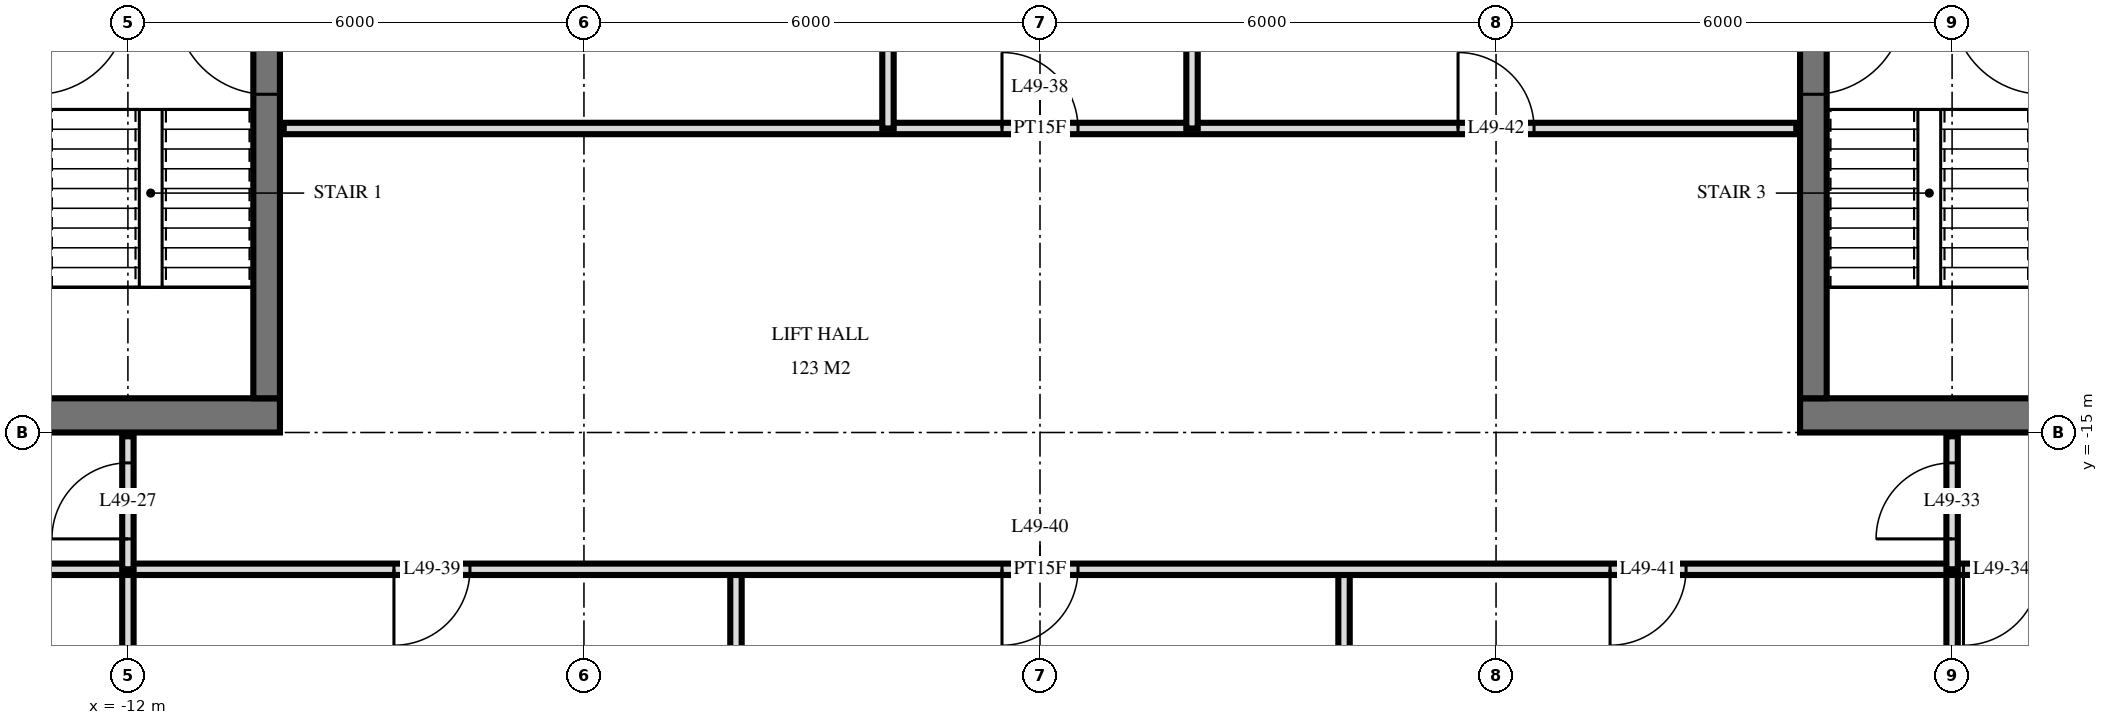
"""IFC4 building model, lengths in metres.
Left out: names, types, materials, properties, quantities, classifications, styles, units other than length and angle.
Written with IfcOpenShell. Run it as: python <this file> out.ifc"""

import sys

from ifc_helpers import new_model, si_unit, direction, frame, frame_2d, origin, place, context, subcontext, project, spatial, rectangle, extrude, element, fill, save


model = new_model("IFC4")
c1 = context("Model", 3, precision=1e-05, world=origin(), true_north=direction((0.0, 1.0)))
c2 = subcontext(c1, "Body", "Model", "MODEL_VIEW")
j1 = project(units=[si_unit("LENGTHUNIT", "METRE"), si_unit("PLANEANGLEUNIT", "RADIAN")], contexts=[c1])
p1 = place(None, origin())
s1 = spatial("IfcSite", under=j1, at=p1, CompositionType="ELEMENT")
p2 = place(p1, origin())
s2 = spatial("IfcBuilding", under=s1, at=p2, CompositionType="ELEMENT")
p3 = place(p2, frame((0.0, 0.0, 190.6)))
s3 = spatial("IfcBuildingStorey", under=s2, at=p3, CompositionType="ELEMENT", Elevation=190.6)
p4 = place(p3, frame((-24.5, -14.775, 0.0), z_axis=(0.0, 0.0, 1.0), x_axis=(1.0, 0.0, 0.0)))
e1 = element("IfcWall", 1, at=p4, inside=s3, PredefinedType="SHEAR", context=c2, shape_type="SweptSolid", body=[
    extrude(rectangle(XDim=14.5, YDim=0.45, at=frame_2d((7.25, 0.0))), origin(), (0.0, 0.0, 1.0), 3.5),
])
p5 = place(p4, frame((6.2, 0.0, 0.0)))
e2 = element("IfcOpeningElement", 2, at=p5, cuts=e1, PredefinedType="OPENING", context=c2, shape_type="SweptSolid", body=[
    extrude(rectangle(XDim=1.2, YDim=2.1, at=frame_2d((0.6, 1.05))), frame((0.0, 0.235, 0.0), z_axis=(0.0, -1.0, 0.0), x_axis=(1.0, 0.0, 0.0)), (0.0, 0.0, 1.0), 0.47),
])
p6 = place(p4, frame((9.25, 0.0, 0.0)))
e3 = element("IfcOpeningElement", 3, at=p6, cuts=e1, PredefinedType="OPENING", context=c2, shape_type="SweptSolid", body=[
    extrude(rectangle(XDim=1.1, YDim=2.1, at=frame_2d((0.55, 1.05))), frame((0.0, 0.235, 0.0), z_axis=(0.0, -1.0, 0.0), x_axis=(1.0, 0.0, 0.0)), (0.0, 0.0, 1.0), 0.47),
])
p7 = place(p4, frame((3.5, 0.0, 0.0)))
e4 = element("IfcOpeningElement", 4, at=p7, cuts=e1, PredefinedType="OPENING", context=c2, shape_type="SweptSolid", body=[
    extrude(rectangle(XDim=0.9, YDim=2.1, at=frame_2d((0.45, 1.05))), frame((0.0, 0.235, 0.0), z_axis=(0.0, -1.0, 0.0), x_axis=(1.0, 0.0, 0.0)), (0.0, 0.0, 1.0), 0.47),
])
p8 = place(p4, frame((1.05, 0.0, 0.0)))
e5 = element("IfcOpeningElement", 5, at=p8, cuts=e1, PredefinedType="OPENING", context=c2, shape_type="SweptSolid", body=[
    extrude(rectangle(XDim=1.0, YDim=2.1, at=frame_2d((0.5, 1.05))), frame((0.0, 0.235, 0.0), z_axis=(0.0, -1.0, 0.0), x_axis=(1.0, 0.0, 0.0)), (0.0, 0.0, 1.0), 0.47),
])
p9 = place(p3, frame((-10.175, -14.55, 0.0), z_axis=(0.0, 0.0, 1.0), x_axis=(0.0, 1.0, 0.0)))
e6 = element("IfcWall", 6, at=p9, inside=s3, PredefinedType="SHEAR", context=c2, shape_type="SweptSolid", body=[
    extrude(rectangle(XDim=14.1, YDim=0.35, at=frame_2d((7.05, 0.0))), origin(), (0.0, 0.0, 1.0), 3.5),
])
p10 = place(p9, frame((8.4, 0.0, 0.0)))
e7 = element("IfcOpeningElement", 7, at=p10, cuts=e6, PredefinedType="OPENING", context=c2, shape_type="SweptSolid", body=[
    extrude(rectangle(XDim=1.4, YDim=2.4, at=frame_2d((0.7, 1.2))), frame((0.0, 0.185, 0.0), z_axis=(0.0, -1.0, 0.0), x_axis=(1.0, 0.0, 0.0)), (0.0, 0.0, 1.0), 0.37),
])
p11 = place(p9, frame((10.0, 0.0, 0.0)))
e8 = element("IfcOpeningElement", 8, at=p11, cuts=e6, PredefinedType="OPENING", context=c2, shape_type="SweptSolid", body=[
    extrude(rectangle(XDim=1.4, YDim=2.4, at=frame_2d((0.7, 1.2))), frame((0.0, 0.185, 0.0), z_axis=(0.0, -1.0, 0.0), x_axis=(1.0, 0.0, 0.0)), (0.0, 0.0, 1.0), 0.37),
])
p12 = place(p9, frame((4.0, 0.0, 0.0)))
e9 = element("IfcOpeningElement", 9, at=p12, cuts=e6, PredefinedType="OPENING", context=c2, shape_type="SweptSolid", body=[
    extrude(rectangle(XDim=1.2, YDim=2.1, at=frame_2d((0.6, 1.05))), frame((0.0, 0.185, 0.0), z_axis=(0.0, -1.0, 0.0), x_axis=(1.0, 0.0, 0.0)), (0.0, 0.0, 1.0), 0.37),
])
p13 = place(p3, frame((10.0, -14.775, 0.0), z_axis=(0.0, 0.0, 1.0), x_axis=(1.0, 0.0, 0.0)))
e10 = element("IfcWall", 10, at=p13, inside=s3, PredefinedType="SHEAR", context=c2, shape_type="SweptSolid", body=[
    extrude(rectangle(XDim=14.5, YDim=0.45, at=frame_2d((7.25, 0.0))), origin(), (0.0, 0.0, 1.0), 3.5),
])
p14 = place(p13, frame((7.1, 0.0, 0.0)))
e11 = element("IfcOpeningElement", 11, at=p14, cuts=e10, PredefinedType="OPENING", context=c2, shape_type="SweptSolid", body=[
    extrude(rectangle(XDim=1.2, YDim=2.1, at=frame_2d((0.6, 1.05))), frame((0.0, 0.235, 0.0), z_axis=(0.0, -1.0, 0.0), x_axis=(1.0, 0.0, 0.0)), (0.0, 0.0, 1.0), 0.47),
])
p15 = place(p13, frame((4.15, 0.0, 0.0)))
e12 = element("IfcOpeningElement", 12, at=p15, cuts=e10, PredefinedType="OPENING", context=c2, shape_type="SweptSolid", body=[
    extrude(rectangle(XDim=1.1, YDim=2.1, at=frame_2d((0.55, 1.05))), frame((0.0, 0.235, 0.0), z_axis=(0.0, -1.0, 0.0), x_axis=(1.0, 0.0, 0.0)), (0.0, 0.0, 1.0), 0.47),
])
p16 = place(p13, frame((10.1, 0.0, 0.0)))
e13 = element("IfcOpeningElement", 13, at=p16, cuts=e10, PredefinedType="OPENING", context=c2, shape_type="SweptSolid", body=[
    extrude(rectangle(XDim=0.9, YDim=2.1, at=frame_2d((0.45, 1.05))), frame((0.0, 0.235, 0.0), z_axis=(0.0, -1.0, 0.0), x_axis=(1.0, 0.0, 0.0)), (0.0, 0.0, 1.0), 0.47),
])
p17 = place(p13, frame((12.45, 0.0, 0.0)))
e14 = element("IfcOpeningElement", 14, at=p17, cuts=e10, PredefinedType="OPENING", context=c2, shape_type="SweptSolid", body=[
    extrude(rectangle(XDim=1.0, YDim=2.1, at=frame_2d((0.5, 1.05))), frame((0.0, 0.235, 0.0), z_axis=(0.0, -1.0, 0.0), x_axis=(1.0, 0.0, 0.0)), (0.0, 0.0, 1.0), 0.47),
])
p18 = place(p3, frame((10.175, -14.55, 0.0), z_axis=(0.0, 0.0, 1.0), x_axis=(0.0, 1.0, 0.0)))
e15 = element("IfcWall", 15, at=p18, inside=s3, PredefinedType="SHEAR", context=c2, shape_type="SweptSolid", body=[
    extrude(rectangle(XDim=14.1, YDim=0.35, at=frame_2d((7.05, 0.0))), origin(), (0.0, 0.0, 1.0), 3.5),
])
p19 = place(p18, frame((8.4, 0.0, 0.0)))
e16 = element("IfcOpeningElement", 16, at=p19, cuts=e15, PredefinedType="OPENING", context=c2, shape_type="SweptSolid", body=[
    extrude(rectangle(XDim=1.4, YDim=2.4, at=frame_2d((0.7, 1.2))), frame((0.0, 0.185, 0.0), z_axis=(0.0, -1.0, 0.0), x_axis=(1.0, 0.0, 0.0)), (0.0, 0.0, 1.0), 0.37),
])
p20 = place(p18, frame((10.0, 0.0, 0.0)))
e17 = element("IfcOpeningElement", 17, at=p20, cuts=e15, PredefinedType="OPENING", context=c2, shape_type="SweptSolid", body=[
    extrude(rectangle(XDim=1.4, YDim=2.4, at=frame_2d((0.7, 1.2))), frame((0.0, 0.185, 0.0), z_axis=(0.0, -1.0, 0.0), x_axis=(1.0, 0.0, 0.0)), (0.0, 0.0, 1.0), 0.37),
])
p21 = place(p18, frame((4.0, 0.0, 0.0)))
e18 = element("IfcOpeningElement", 18, at=p21, cuts=e15, PredefinedType="OPENING", context=c2, shape_type="SweptSolid", body=[
    extrude(rectangle(XDim=1.2, YDim=2.1, at=frame_2d((0.6, 1.05))), frame((0.0, 0.185, 0.0), z_axis=(0.0, -1.0, 0.0), x_axis=(1.0, 0.0, 0.0)), (0.0, 0.0, 1.0), 0.37),
])
p22 = place(p3, frame((12.0, -16.8, 0.0), z_axis=(0.0, 0.0, 1.0), x_axis=(0.0, 1.0, 0.0)))
e19 = element("IfcWall", 19, at=p22, inside=s3, PredefinedType="PARTITIONING", context=c2, shape_type="SweptSolid", body=[
    extrude(rectangle(XDim=1.75, YDim=0.15, at=frame_2d((0.875, 0.0))), origin(), (0.0, 0.0, 1.0), 3.22),
])
p23 = place(p22, frame((0.4, 0.0, 0.0)))
e20 = element("IfcOpeningElement", 20, at=p23, cuts=e19, PredefinedType="OPENING", context=c2, shape_type="SweptSolid", body=[
    extrude(rectangle(XDim=1.0, YDim=2.1, at=frame_2d((0.5, 1.05))), frame((0.0, 0.085, 0.0), z_axis=(0.0, -1.0, 0.0), x_axis=(1.0, 0.0, 0.0)), (0.0, 0.0, 1.0), 0.17),
])
for number, where, z_axis, x_axis in (
    (21, (12.0, -29.22, 0.0), (0.0, 0.0, 1.0), (0.0, 1.0, 0.0)),
    (22, (4.0, -29.22, 0.0), (0.0, 0.0, 1.0), (0.0, 1.0, 0.0)),
):
    element("IfcWall", number, at=place(p3, frame(where, z_axis=z_axis, x_axis=x_axis)), inside=s3, PredefinedType="PARTITIONING", context=c2, shape_type="SweptSolid", body=[
        extrude(rectangle(XDim=12.42, YDim=0.15, at=frame_2d((6.21, 0.0))), origin(), (0.0, 0.0, 1.0), 3.22),
    ])
for number, where, z_axis, x_axis in (
    (23, (2.0, -11.0, 0.0), (0.0, 0.0, 1.0), (0.0, 1.0, 0.0)),
    (24, (-2.0, -11.0, 0.0), (0.0, 0.0, 1.0), (0.0, 1.0, 0.0)),
):
    element("IfcWall", number, at=place(p3, frame(where, z_axis=z_axis, x_axis=x_axis)), inside=s3, PredefinedType="PARTITIONING", context=c2, shape_type="SweptSolid", body=[
        extrude(rectangle(XDim=4.0, YDim=0.15, at=frame_2d((2.0, 0.0))), origin(), (0.0, 0.0, 1.0), 3.22),
    ])
p24 = place(p3, frame((-4.0, -29.22, 0.0), z_axis=(0.0, 0.0, 1.0), x_axis=(0.0, 1.0, 0.0)))
e25 = element("IfcWall", 25, at=p24, inside=s3, PredefinedType="PARTITIONING", context=c2, shape_type="SweptSolid", body=[
    extrude(rectangle(XDim=12.42, YDim=0.15, at=frame_2d((6.21, 0.0))), origin(), (0.0, 0.0, 1.0), 3.22),
])
p25 = place(p3, frame((-12.0, -16.8, 0.0), z_axis=(0.0, 0.0, 1.0), x_axis=(0.0, 1.0, 0.0)))
e26 = element("IfcWall", 26, at=p25, inside=s3, PredefinedType="PARTITIONING", context=c2, shape_type="SweptSolid", body=[
    extrude(rectangle(XDim=1.75, YDim=0.15, at=frame_2d((0.875, 0.0))), origin(), (0.0, 0.0, 1.0), 3.22),
])
p26 = place(p25, frame((0.4, 0.0, 0.0)))
e27 = element("IfcOpeningElement", 27, at=p26, cuts=e26, PredefinedType="OPENING", context=c2, shape_type="SweptSolid", body=[
    extrude(rectangle(XDim=1.0, YDim=2.1, at=frame_2d((0.5, 1.05))), frame((0.0, 0.085, 0.0), z_axis=(0.0, -1.0, 0.0), x_axis=(1.0, 0.0, 0.0)), (0.0, 0.0, 1.0), 0.17),
])
p27 = place(p3, frame((-12.0, -29.22, 0.0), z_axis=(0.0, 0.0, 1.0), x_axis=(0.0, 1.0, 0.0)))
e28 = element("IfcWall", 28, at=p27, inside=s3, PredefinedType="PARTITIONING", context=c2, shape_type="SweptSolid", body=[
    extrude(rectangle(XDim=12.42, YDim=0.15, at=frame_2d((6.21, 0.0))), origin(), (0.0, 0.0, 1.0), 3.22),
])
p28 = place(p3, frame((-26.82, -16.8, 0.0), z_axis=(0.0, 0.0, 1.0), x_axis=(1.0, 0.0, 0.0)))
e29 = element("IfcWall", 29, at=p28, inside=s3, PredefinedType="PARTITIONING", context=c2, shape_type="SweptSolid", body=[
    extrude(rectangle(XDim=53.64, YDim=0.15, at=frame_2d((26.82, 0.0))), origin(), (0.0, 0.0, 1.0), 3.22),
])
p29 = place(p28, frame((11.97, 0.0, 0.0)))
e30 = element("IfcOpeningElement", 30, at=p29, cuts=e29, PredefinedType="OPENING", context=c2, shape_type="SweptSolid", body=[
    extrude(rectangle(XDim=1.0, YDim=2.1, at=frame_2d((0.5, 1.05))), frame((0.0, 0.085, 0.0), z_axis=(0.0, -1.0, 0.0), x_axis=(1.0, 0.0, 0.0)), (0.0, 0.0, 1.0), 0.17),
])
p30 = place(p28, frame((10.67, 0.0, 0.0)))
e31 = element("IfcOpeningElement", 31, at=p30, cuts=e29, PredefinedType="OPENING", context=c2, shape_type="SweptSolid", body=[
    extrude(rectangle(XDim=1.0, YDim=2.1, at=frame_2d((0.5, 1.05))), frame((0.0, 0.085, 0.0), z_axis=(0.0, -1.0, 0.0), x_axis=(1.0, 0.0, 0.0)), (0.0, 0.0, 1.0), 0.17),
])
p31 = place(p28, frame((3.22, 0.0, 0.0)))
e32 = element("IfcOpeningElement", 32, at=p31, cuts=e29, PredefinedType="OPENING", context=c2, shape_type="SweptSolid", body=[
    extrude(rectangle(XDim=1.0, YDim=2.1, at=frame_2d((0.5, 1.05))), frame((0.0, 0.085, 0.0), z_axis=(0.0, -1.0, 0.0), x_axis=(1.0, 0.0, 0.0)), (0.0, 0.0, 1.0), 0.17),
])
p32 = place(p28, frame((5.02, 0.0, 0.0)))
e33 = element("IfcOpeningElement", 33, at=p32, cuts=e29, PredefinedType="OPENING", context=c2, shape_type="SweptSolid", body=[
    extrude(rectangle(XDim=1.0, YDim=2.1, at=frame_2d((0.5, 1.05))), frame((0.0, 0.085, 0.0), z_axis=(0.0, -1.0, 0.0), x_axis=(1.0, 0.0, 0.0)), (0.0, 0.0, 1.0), 0.17),
])
p33 = place(p28, frame((38.97, 0.0, 0.0)))
e34 = element("IfcOpeningElement", 34, at=p33, cuts=e29, PredefinedType="OPENING", context=c2, shape_type="SweptSolid", body=[
    extrude(rectangle(XDim=1.0, YDim=2.1, at=frame_2d((0.5, 1.05))), frame((0.0, 0.085, 0.0), z_axis=(0.0, -1.0, 0.0), x_axis=(1.0, 0.0, 0.0)), (0.0, 0.0, 1.0), 0.17),
])
p34 = place(p28, frame((48.72, 0.0, 0.0)))
e35 = element("IfcOpeningElement", 35, at=p34, cuts=e29, PredefinedType="OPENING", context=c2, shape_type="SweptSolid", body=[
    extrude(rectangle(XDim=1.0, YDim=2.1, at=frame_2d((0.5, 1.05))), frame((0.0, 0.085, 0.0), z_axis=(0.0, -1.0, 0.0), x_axis=(1.0, 0.0, 0.0)), (0.0, 0.0, 1.0), 0.17),
])
p35 = place(p28, frame((46.92, 0.0, 0.0)))
e36 = element("IfcOpeningElement", 36, at=p35, cuts=e29, PredefinedType="OPENING", context=c2, shape_type="SweptSolid", body=[
    extrude(rectangle(XDim=1.0, YDim=2.1, at=frame_2d((0.5, 1.05))), frame((0.0, 0.085, 0.0), z_axis=(0.0, -1.0, 0.0), x_axis=(1.0, 0.0, 0.0)), (0.0, 0.0, 1.0), 0.17),
])
p36 = place(p28, frame((18.32, 0.0, 0.0)))
e37 = element("IfcOpeningElement", 37, at=p36, cuts=e29, PredefinedType="OPENING", context=c2, shape_type="SweptSolid", body=[
    extrude(rectangle(XDim=1.0, YDim=2.1, at=frame_2d((0.5, 1.05))), frame((0.0, 0.085, 0.0), z_axis=(0.0, -1.0, 0.0), x_axis=(1.0, 0.0, 0.0)), (0.0, 0.0, 1.0), 0.17),
])
p37 = place(p28, frame((26.32, 0.0, 0.0)))
e38 = element("IfcOpeningElement", 38, at=p37, cuts=e29, PredefinedType="OPENING", context=c2, shape_type="SweptSolid", body=[
    extrude(rectangle(XDim=1.0, YDim=2.1, at=frame_2d((0.5, 1.05))), frame((0.0, 0.085, 0.0), z_axis=(0.0, -1.0, 0.0), x_axis=(1.0, 0.0, 0.0)), (0.0, 0.0, 1.0), 0.17),
])
p38 = place(p28, frame((34.32, 0.0, 0.0)))
e39 = element("IfcOpeningElement", 39, at=p38, cuts=e29, PredefinedType="OPENING", context=c2, shape_type="SweptSolid", body=[
    extrude(rectangle(XDim=1.0, YDim=2.1, at=frame_2d((0.5, 1.05))), frame((0.0, 0.085, 0.0), z_axis=(0.0, -1.0, 0.0), x_axis=(1.0, 0.0, 0.0)), (0.0, 0.0, 1.0), 0.17),
])
p39 = place(p3, frame((-9.95, -11.0, 0.0), z_axis=(0.0, 0.0, 1.0), x_axis=(1.0, 0.0, 0.0)))
e40 = element("IfcWall", 40, at=p39, inside=s3, PredefinedType="PARTITIONING", context=c2, shape_type="SweptSolid", body=[
    extrude(rectangle(XDim=19.9, YDim=0.15, at=frame_2d((9.95, 0.0))), origin(), (0.0, 0.0, 1.0), 3.22),
])
p40 = place(p39, frame((9.45, 0.0, 0.0)))
e41 = element("IfcOpeningElement", 41, at=p40, cuts=e40, PredefinedType="OPENING", context=c2, shape_type="SweptSolid", body=[
    extrude(rectangle(XDim=1.0, YDim=2.1, at=frame_2d((0.5, 1.05))), frame((0.0, 0.085, 0.0), z_axis=(0.0, -1.0, 0.0), x_axis=(1.0, 0.0, 0.0)), (0.0, 0.0, 1.0), 0.17),
])
p41 = place(p39, frame((15.45, 0.0, 0.0)))
e42 = element("IfcOpeningElement", 42, at=p41, cuts=e40, PredefinedType="OPENING", context=c2, shape_type="SweptSolid", body=[
    extrude(rectangle(XDim=1.0, YDim=2.1, at=frame_2d((0.5, 1.05))), frame((0.0, 0.085, 0.0), z_axis=(0.0, -1.0, 0.0), x_axis=(1.0, 0.0, 0.0)), (0.0, 0.0, 1.0), 0.17),
])
p42 = place(p12, origin())
e43 = element("IfcDoor", 43, at=p42, inside=s3, OperationType="SINGLE_SWING_LEFT", PredefinedType="DOOR", context=c2, shape_type="SweptSolid", body=[
    extrude(rectangle(XDim=1.2, YDim=2.1, at=frame_2d((0.6, 1.05))), frame((0.0, 0.025, 0.0), z_axis=(0.0, -1.0, 0.0), x_axis=(1.0, 0.0, 0.0)), (0.0, 0.0, 1.0), 0.05),
])
fill(e9, e43)
p43 = place(p21, frame((0.6, 0.0, 0.0), z_axis=(0.0, 0.0, 1.0), x_axis=(-1.0, 0.0, 0.0)))
e44 = element("IfcDoor", 44, at=p43, inside=s3, OperationType="SINGLE_SWING_RIGHT", PredefinedType="DOOR", context=c2, shape_type="SweptSolid", body=[
    extrude(rectangle(XDim=1.2, YDim=2.1, at=frame_2d((0.0, 1.05))), frame((0.0, -0.025, 0.0), z_axis=(0.0, 1.0, 0.0), x_axis=(-1.0, 0.0, 0.0)), (0.0, 0.0, 1.0), 0.05),
])
fill(e18, e44)
p44 = place(p26, origin())
e45 = element("IfcDoor", 45, at=p44, inside=s3, OperationType="SINGLE_SWING_RIGHT", PredefinedType="DOOR", context=c2, shape_type="SweptSolid", body=[
    extrude(rectangle(XDim=1.0, YDim=2.1, at=frame_2d((0.5, 1.05))), frame((0.0, 0.025, 0.0), z_axis=(0.0, -1.0, 0.0), x_axis=(1.0, 0.0, 0.0)), (0.0, 0.0, 1.0), 0.05),
])
fill(e27, e45)
p45 = place(p23, origin())
e46 = element("IfcDoor", 46, at=p45, inside=s3, OperationType="SINGLE_SWING_RIGHT", PredefinedType="DOOR", context=c2, shape_type="SweptSolid", body=[
    extrude(rectangle(XDim=1.0, YDim=2.1, at=frame_2d((0.5, 1.05))), frame((0.0, 0.025, 0.0), z_axis=(0.0, -1.0, 0.0), x_axis=(1.0, 0.0, 0.0)), (0.0, 0.0, 1.0), 0.05),
])
fill(e20, e46)
p46 = place(p33, frame((0.5, 0.0, 0.0), z_axis=(0.0, 0.0, 1.0), x_axis=(-1.0, 0.0, 0.0)))
e47 = element("IfcDoor", 47, at=p46, inside=s3, OperationType="SINGLE_SWING_LEFT", PredefinedType="DOOR", context=c2, shape_type="SweptSolid", body=[
    extrude(rectangle(XDim=1.0, YDim=2.1, at=frame_2d((0.0, 1.05))), frame((0.0, -0.025, 0.0), z_axis=(0.0, 1.0, 0.0), x_axis=(-1.0, 0.0, 0.0)), (0.0, 0.0, 1.0), 0.05),
])
fill(e34, e47)
p47 = place(p40, origin())
e48 = element("IfcDoor", 48, at=p47, inside=s3, OperationType="SINGLE_SWING_RIGHT", PredefinedType="DOOR", context=c2, shape_type="SweptSolid", body=[
    extrude(rectangle(XDim=1.0, YDim=2.1, at=frame_2d((0.5, 1.05))), frame((0.0, 0.025, 0.0), z_axis=(0.0, -1.0, 0.0), x_axis=(1.0, 0.0, 0.0)), (0.0, 0.0, 1.0), 0.05),
])
fill(e41, e48)
p48 = place(p36, frame((0.5, 0.0, 0.0), z_axis=(0.0, 0.0, 1.0), x_axis=(-1.0, 0.0, 0.0)))
e49 = element("IfcDoor", 49, at=p48, inside=s3, OperationType="SINGLE_SWING_LEFT", PredefinedType="DOOR", context=c2, shape_type="SweptSolid", body=[
    extrude(rectangle(XDim=1.0, YDim=2.1, at=frame_2d((0.0, 1.05))), frame((0.0, -0.025, 0.0), z_axis=(0.0, 1.0, 0.0), x_axis=(-1.0, 0.0, 0.0)), (0.0, 0.0, 1.0), 0.05),
])
fill(e37, e49)
p49 = place(p37, frame((0.5, 0.0, 0.0), z_axis=(0.0, 0.0, 1.0), x_axis=(-1.0, 0.0, 0.0)))
e50 = element("IfcDoor", 50, at=p49, inside=s3, OperationType="SINGLE_SWING_LEFT", PredefinedType="DOOR", context=c2, shape_type="SweptSolid", body=[
    extrude(rectangle(XDim=1.0, YDim=2.1, at=frame_2d((0.0, 1.05))), frame((0.0, -0.025, 0.0), z_axis=(0.0, 1.0, 0.0), x_axis=(-1.0, 0.0, 0.0)), (0.0, 0.0, 1.0), 0.05),
])
fill(e38, e50)
p50 = place(p38, frame((0.5, 0.0, 0.0), z_axis=(0.0, 0.0, 1.0), x_axis=(-1.0, 0.0, 0.0)))
e51 = element("IfcDoor", 51, at=p50, inside=s3, OperationType="SINGLE_SWING_LEFT", PredefinedType="DOOR", context=c2, shape_type="SweptSolid", body=[
    extrude(rectangle(XDim=1.0, YDim=2.1, at=frame_2d((0.0, 1.05))), frame((0.0, -0.025, 0.0), z_axis=(0.0, 1.0, 0.0), x_axis=(-1.0, 0.0, 0.0)), (0.0, 0.0, 1.0), 0.05),
])
fill(e39, e51)
p51 = place(p41, origin())
e52 = element("IfcDoor", 52, at=p51, inside=s3, OperationType="SINGLE_SWING_RIGHT", PredefinedType="DOOR", context=c2, shape_type="SweptSolid", body=[
    extrude(rectangle(XDim=1.0, YDim=2.1, at=frame_2d((0.5, 1.05))), frame((0.0, 0.025, 0.0), z_axis=(0.0, -1.0, 0.0), x_axis=(1.0, 0.0, 0.0)), (0.0, 0.0, 1.0), 0.05),
])
fill(e42, e52)
save(model, sys.argv[1])
